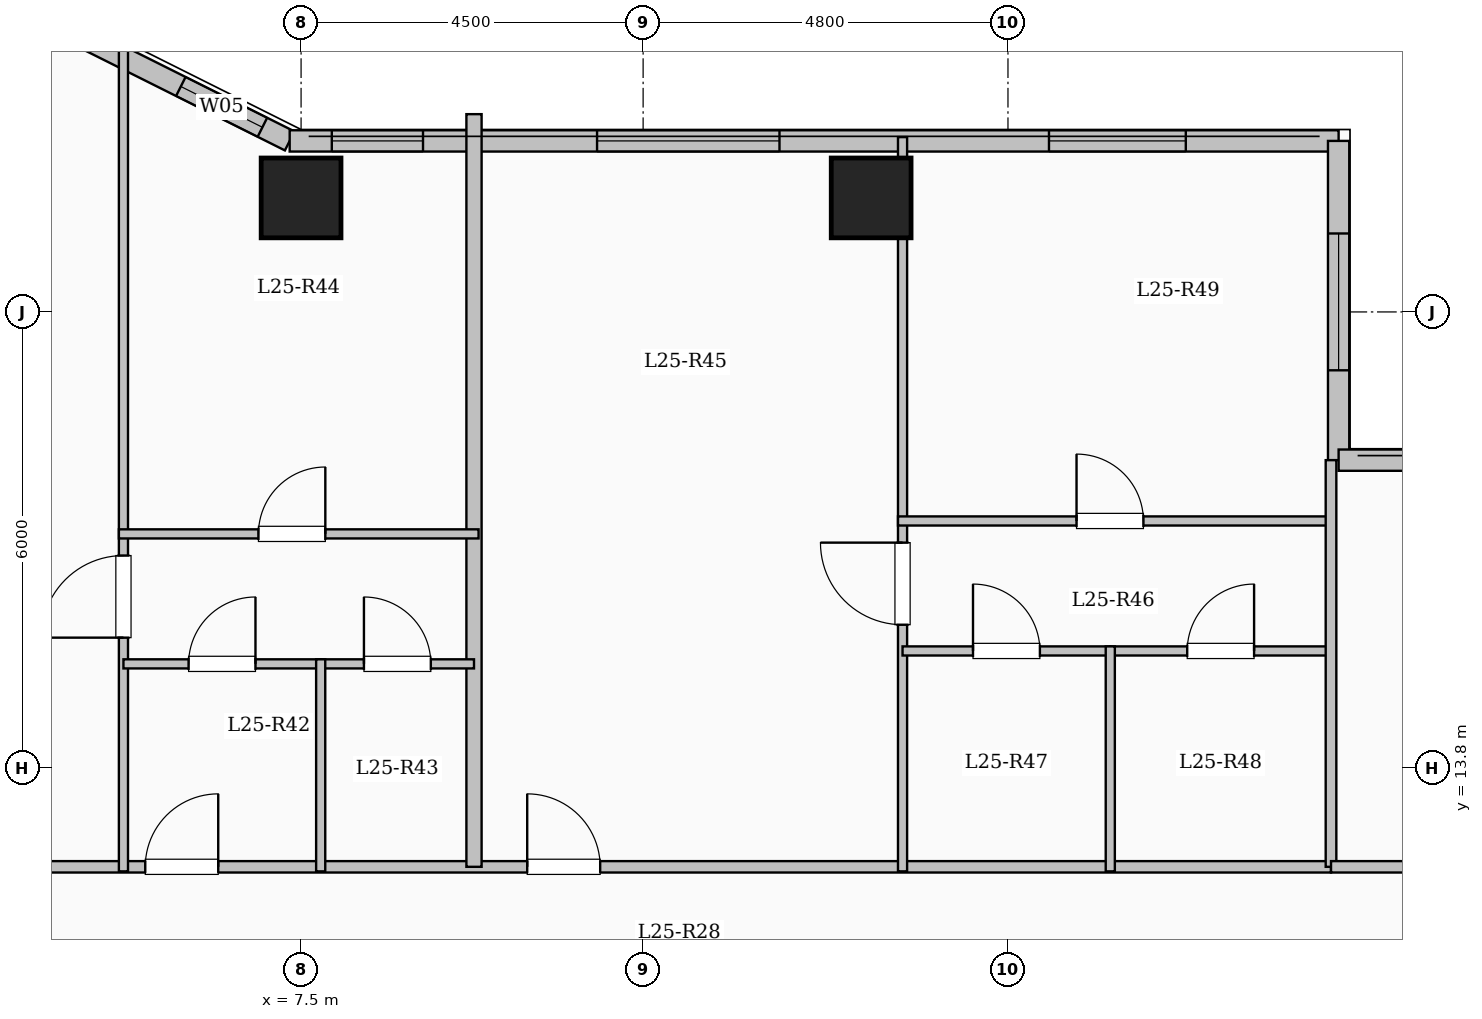
"""IFC4 building model, lengths in metres.
Left out: names, types, materials, properties, quantities, classifications, styles, units other than length and angle.
Written with IfcOpenShell. Run it as: python <this file> out.ifc"""

import sys

from ifc_helpers import new_model, si_unit, direction, frame, frame_2d, origin, origin_2d, place, context, subcontext, project, spatial, rectangle, extrude, element, fill, save


model = new_model("IFC4")
c1 = context("Model", 3, precision=1e-05, world=origin(), true_north=direction((0.0, 1.0)))
c2 = subcontext(c1, "Body", "Model", "MODEL_VIEW")
j1 = project(units=[si_unit("LENGTHUNIT", "METRE"), si_unit("PLANEANGLEUNIT", "RADIAN")], contexts=[c1])
p1 = place(None, origin())
s1 = spatial("IfcSite", under=j1, at=p1, CompositionType="ELEMENT")
p2 = place(p1, origin())
s2 = spatial("IfcBuilding", under=s1, at=p2, CompositionType="ELEMENT")
p3 = place(p2, frame((0.0, 0.0, 95.05)))
s3 = spatial("IfcBuildingStorey", under=s2, at=p3, CompositionType="ELEMENT", Elevation=95.05)
for number, where, z_axis, x_axis in (
    (1, (7.5, 21.3, 0.0), (0.0, 0.0, 1.0), (1.0, 0.0, 0.0)),
    (2, (15.0, 21.3, 0.0), (0.0, 0.0, 1.0), (1.0, 0.0, 0.0)),
):
    element("IfcColumn", number, at=place(p3, frame(where, z_axis=z_axis, x_axis=x_axis)), inside=s3, PredefinedType="COLUMN", context=c2, shape_type="SweptSolid", body=[
        extrude(rectangle(XDim=1.05, YDim=1.05, at=origin_2d()), origin(), (0.0, 0.0, 1.0), 3.35),
    ])
p4 = place(p3, frame((4.35, 23.55, 0.0), z_axis=(0.0, 0.0, 1.0), x_axis=(0.894427191, -0.4472135955, 0.0)))
e3 = element("IfcWall", 3, at=p4, inside=s3, PredefinedType="SOLIDWALL", context=c2, shape_type="SweptSolid", body=[
    extrude(rectangle(XDim=3.354, YDim=0.28, at=frame_2d((1.677, 0.0))), origin(), (0.0, 0.0, 1.0), 3.1),
])
p5 = place(p4, frame((1.753, 0.0, 0.95)))
e4 = element("IfcOpeningElement", 4, at=p5, cuts=e3, PredefinedType="OPENING", context=c2, shape_type="SweptSolid", body=[
    extrude(rectangle(XDim=1.2, YDim=1.5, at=frame_2d((0.6, 0.75))), frame((0.0, 0.15, 0.0), z_axis=(0.0, -1.0, 0.0), x_axis=(1.0, 0.0, 0.0)), (0.0, 0.0, 1.0), 0.3),
])
p6 = place(p3, frame((7.35, 22.05, 0.0), z_axis=(0.0, 0.0, 1.0), x_axis=(1.0, 0.0, 0.0)))
e5 = element("IfcWall", 5, at=p6, inside=s3, PredefinedType="SOLIDWALL", context=c2, shape_type="SweptSolid", body=[
    extrude(rectangle(XDim=13.8, YDim=0.28, at=frame_2d((6.9, 0.0))), origin(), (0.0, 0.0, 1.0), 3.1),
])
p7 = place(p6, frame((0.554, 0.0, 0.95)))
e6 = element("IfcOpeningElement", 6, at=p7, cuts=e5, PredefinedType="OPENING", context=c2, shape_type="SweptSolid", body=[
    extrude(rectangle(XDim=1.2, YDim=1.5, at=frame_2d((0.6, 0.75))), frame((0.0, 0.15, 0.0), z_axis=(0.0, -1.0, 0.0), x_axis=(1.0, 0.0, 0.0)), (0.0, 0.0, 1.0), 0.3),
])
p8 = place(p6, frame((4.044, 0.0, 0.9)))
e7 = element("IfcOpeningElement", 7, at=p8, cuts=e5, PredefinedType="OPENING", context=c2, shape_type="SweptSolid", body=[
    extrude(rectangle(XDim=2.4, YDim=1.8, at=frame_2d((1.2, 0.9))), frame((0.0, 0.15, 0.0), z_axis=(0.0, -1.0, 0.0), x_axis=(1.0, 0.0, 0.0)), (0.0, 0.0, 1.0), 0.3),
])
p9 = place(p6, frame((9.99, 0.0, 0.9)))
e8 = element("IfcOpeningElement", 8, at=p9, cuts=e5, PredefinedType="OPENING", context=c2, shape_type="SweptSolid", body=[
    extrude(rectangle(XDim=1.8, YDim=1.65, at=frame_2d((0.9, 0.825))), frame((0.0, 0.15, 0.0), z_axis=(0.0, -1.0, 0.0), x_axis=(1.0, 0.0, 0.0)), (0.0, 0.0, 1.0), 0.3),
])
p10 = place(p3, frame((21.15, 22.05, 0.0), z_axis=(0.0, 0.0, 1.0), x_axis=(0.0, -1.0, 0.0)))
e9 = element("IfcWall", 9, at=p10, inside=s3, PredefinedType="SOLIDWALL", context=c2, shape_type="SweptSolid", body=[
    extrude(rectangle(XDim=4.2, YDim=0.28, at=frame_2d((2.1, 0.0))), origin(), (0.0, 0.0, 1.0), 3.1),
])
p11 = place(p10, frame((1.218, 0.0, 0.9)))
e10 = element("IfcOpeningElement", 10, at=p11, cuts=e9, PredefinedType="OPENING", context=c2, shape_type="SweptSolid", body=[
    extrude(rectangle(XDim=1.8, YDim=1.65, at=frame_2d((0.9, 0.825))), frame((0.0, 0.15, 0.0), z_axis=(0.0, -1.0, 0.0), x_axis=(1.0, 0.0, 0.0)), (0.0, 0.0, 1.0), 0.3),
])
p12 = place(p3, frame((21.15, 17.85, 0.0), z_axis=(0.0, 0.0, 1.0), x_axis=(1.0, 0.0, 0.0)))
e11 = element("IfcWall", 11, at=p12, inside=s3, PredefinedType="SOLIDWALL", context=c2, shape_type="SweptSolid", body=[
    extrude(rectangle(XDim=5.7, YDim=0.28, at=frame_2d((2.85, 0.0))), origin(), (0.0, 0.0, 1.0), 3.1),
])
p13 = place(p12, frame((1.825, 0.0, 0.9)))
e12 = element("IfcOpeningElement", 12, at=p13, cuts=e11, PredefinedType="OPENING", context=c2, shape_type="SweptSolid", body=[
    extrude(rectangle(XDim=2.0, YDim=1.7, at=frame_2d((1.0, 0.85))), frame((0.0, 0.15, 0.0), z_axis=(0.0, -1.0, 0.0), x_axis=(1.0, 0.0, 0.0)), (0.0, 0.0, 1.0), 0.3),
])
p14 = place(p3, frame((3.85, 12.5, 0.0), z_axis=(0.0, 0.0, 1.0), x_axis=(1.0, 0.0, 0.0)))
e13 = element("IfcWall", 13, at=p14, inside=s3, PredefinedType="PARTITIONING", context=c2, shape_type="SweptSolid", body=[
    extrude(rectangle(XDim=17.2, YDim=0.15, at=frame_2d((8.6, 0.0))), origin(), (0.0, 0.0, 1.0), 3.1),
])
p15 = place(p14, frame((1.6, 0.0, 0.0)))
e14 = element("IfcOpeningElement", 14, at=p15, cuts=e13, PredefinedType="OPENING", context=c2, shape_type="SweptSolid", body=[
    extrude(rectangle(XDim=0.96, YDim=2.15, at=frame_2d((0.48, 1.075))), frame((0.0, 0.085, 0.0), z_axis=(0.0, -1.0, 0.0), x_axis=(1.0, 0.0, 0.0)), (0.0, 0.0, 1.0), 0.17),
])
p16 = place(p14, frame((6.625, 0.0, 0.0)))
e15 = element("IfcOpeningElement", 15, at=p16, cuts=e13, PredefinedType="OPENING", context=c2, shape_type="SweptSolid", body=[
    extrude(rectangle(XDim=0.96, YDim=2.15, at=frame_2d((0.48, 1.075))), frame((0.0, 0.085, 0.0), z_axis=(0.0, -1.0, 0.0), x_axis=(1.0, 0.0, 0.0)), (0.0, 0.0, 1.0), 0.17),
])
p17 = place(p3, frame((9.775, 12.5, 0.0), z_axis=(0.0, 0.0, 1.0), x_axis=(0.0, 1.0, 0.0)))
e16 = element("IfcWall", 16, at=p17, inside=s3, PredefinedType="SOLIDWALL", context=c2, shape_type="SweptSolid", body=[
    extrude(rectangle(XDim=9.902, YDim=0.2, at=frame_2d((4.951, 0.0))), origin(), (0.0, 0.0, 1.0), 3.1),
])
p18 = place(p3, frame((5.163, 12.44, 0.0), z_axis=(0.0, 0.0, 1.0), x_axis=(0.0, 1.0, 0.0)))
e17 = element("IfcWall", 17, at=p18, inside=s3, PredefinedType="PARTITIONING", context=c2, shape_type="SweptSolid", body=[
    extrude(rectangle(XDim=11.1, YDim=0.12, at=frame_2d((5.55, 0.0))), origin(), (0.0, 0.0, 1.0), 3.1),
])
p19 = place(p18, frame((3.075, 0.0, 0.0)))
e18 = element("IfcOpeningElement", 18, at=p19, cuts=e17, PredefinedType="OPENING", context=c2, shape_type="SweptSolid", body=[
    extrude(rectangle(XDim=1.08, YDim=2.15, at=frame_2d((0.54, 1.075))), frame((0.0, 0.07, 0.0), z_axis=(0.0, -1.0, 0.0), x_axis=(1.0, 0.0, 0.0)), (0.0, 0.0, 1.0), 0.14),
])
p20 = place(p3, frame((5.163, 15.17, 0.0), z_axis=(0.0, 0.0, 1.0), x_axis=(1.0, 0.0, 0.0)))
e19 = element("IfcWall", 19, at=p20, inside=s3, PredefinedType="PARTITIONING", context=c2, shape_type="SweptSolid", body=[
    extrude(rectangle(XDim=2.595, YDim=0.12, at=frame_2d((1.297, 0.0))), origin(), (0.0, 0.0, 1.0), 3.1),
])
p21 = place(p20, frame((0.857, 0.0, 0.0)))
e20 = element("IfcOpeningElement", 20, at=p21, cuts=e19, PredefinedType="OPENING", context=c2, shape_type="SweptSolid", body=[
    extrude(rectangle(XDim=0.88, YDim=2.1, at=frame_2d((0.44, 1.05))), frame((0.0, 0.07, 0.0), z_axis=(0.0, -1.0, 0.0), x_axis=(1.0, 0.0, 0.0)), (0.0, 0.0, 1.0), 0.14),
])
p22 = place(p3, frame((7.758, 15.17, 0.0), z_axis=(0.0, 0.0, 1.0), x_axis=(1.0, 0.0, 0.0)))
e21 = element("IfcWall", 21, at=p22, inside=s3, PredefinedType="PARTITIONING", context=c2, shape_type="SweptSolid", body=[
    extrude(rectangle(XDim=2.017, YDim=0.12, at=frame_2d((1.008, 0.0))), origin(), (0.0, 0.0, 1.0), 3.1),
])
p23 = place(p22, frame((0.569, 0.0, 0.0)))
e22 = element("IfcOpeningElement", 22, at=p23, cuts=e21, PredefinedType="OPENING", context=c2, shape_type="SweptSolid", body=[
    extrude(rectangle(XDim=0.88, YDim=2.1, at=frame_2d((0.44, 1.05))), frame((0.0, 0.07, 0.0), z_axis=(0.0, -1.0, 0.0), x_axis=(1.0, 0.0, 0.0)), (0.0, 0.0, 1.0), 0.14),
])
p24 = place(p3, frame((5.103, 16.88, 0.0), z_axis=(0.0, 0.0, 1.0), x_axis=(1.0, 0.0, 0.0)))
e23 = element("IfcWall", 23, at=p24, inside=s3, PredefinedType="PARTITIONING", context=c2, shape_type="SweptSolid", body=[
    extrude(rectangle(XDim=4.732, YDim=0.12, at=frame_2d((2.366, 0.0))), origin(), (0.0, 0.0, 1.0), 3.1),
])
p25 = place(p24, frame((1.836, 0.0, 0.0)))
e24 = element("IfcOpeningElement", 24, at=p25, cuts=e23, PredefinedType="OPENING", context=c2, shape_type="SweptSolid", body=[
    extrude(rectangle(XDim=0.88, YDim=2.1, at=frame_2d((0.44, 1.05))), frame((0.0, 0.07, 0.0), z_axis=(0.0, -1.0, 0.0), x_axis=(1.0, 0.0, 0.0)), (0.0, 0.0, 1.0), 0.14),
])
p26 = place(p3, frame((7.758, 12.44, 0.0), z_axis=(0.0, 0.0, 1.0), x_axis=(0.0, 1.0, 0.0)))
e25 = element("IfcWall", 25, at=p26, inside=s3, PredefinedType="PARTITIONING", context=c2, shape_type="SweptSolid", body=[
    extrude(rectangle(XDim=2.79, YDim=0.12, at=frame_2d((1.395, 0.0))), origin(), (0.0, 0.0, 1.0), 2.435),
])
p27 = place(p3, frame((15.413, 12.44, 0.0), z_axis=(0.0, 0.0, 1.0), x_axis=(0.0, 1.0, 0.0)))
e26 = element("IfcWall", 26, at=p27, inside=s3, PredefinedType="PARTITIONING", context=c2, shape_type="SweptSolid", body=[
    extrude(rectangle(XDim=9.66, YDim=0.12, at=frame_2d((4.83, 0.0))), origin(), (0.0, 0.0, 1.0), 3.1),
])
p28 = place(p27, frame((3.245, 0.0, 0.0)))
e27 = element("IfcOpeningElement", 27, at=p28, cuts=e26, PredefinedType="OPENING", context=c2, shape_type="SweptSolid", body=[
    extrude(rectangle(XDim=1.08, YDim=2.15, at=frame_2d((0.54, 1.075))), frame((0.0, 0.07, 0.0), z_axis=(0.0, -1.0, 0.0), x_axis=(1.0, 0.0, 0.0)), (0.0, 0.0, 1.0), 0.14),
])
p29 = place(p3, frame((15.413, 15.34, 0.0), z_axis=(0.0, 0.0, 1.0), x_axis=(1.0, 0.0, 0.0)))
e28 = element("IfcWall", 28, at=p29, inside=s3, PredefinedType="PARTITIONING", context=c2, shape_type="SweptSolid", body=[
    extrude(rectangle(XDim=2.733, YDim=0.12, at=frame_2d((1.366, 0.0))), origin(), (0.0, 0.0, 1.0), 3.1),
])
p30 = place(p29, frame((0.927, 0.0, 0.0)))
e29 = element("IfcOpeningElement", 29, at=p30, cuts=e28, PredefinedType="OPENING", context=c2, shape_type="SweptSolid", body=[
    extrude(rectangle(XDim=0.88, YDim=2.1, at=frame_2d((0.44, 1.05))), frame((0.0, 0.07, 0.0), z_axis=(0.0, -1.0, 0.0), x_axis=(1.0, 0.0, 0.0)), (0.0, 0.0, 1.0), 0.14),
])
p31 = place(p3, frame((18.146, 15.34, 0.0), z_axis=(0.0, 0.0, 1.0), x_axis=(1.0, 0.0, 0.0)))
e30 = element("IfcWall", 30, at=p31, inside=s3, PredefinedType="PARTITIONING", context=c2, shape_type="SweptSolid", body=[
    extrude(rectangle(XDim=2.904, YDim=0.12, at=frame_2d((1.452, 0.0))), origin(), (0.0, 0.0, 1.0), 3.1),
])
p32 = place(p31, frame((1.012, 0.0, 0.0)))
e31 = element("IfcOpeningElement", 31, at=p32, cuts=e30, PredefinedType="OPENING", context=c2, shape_type="SweptSolid", body=[
    extrude(rectangle(XDim=0.88, YDim=2.1, at=frame_2d((0.44, 1.05))), frame((0.0, 0.07, 0.0), z_axis=(0.0, -1.0, 0.0), x_axis=(1.0, 0.0, 0.0)), (0.0, 0.0, 1.0), 0.14),
])
p33 = place(p3, frame((15.353, 17.05, 0.0), z_axis=(0.0, 0.0, 1.0), x_axis=(1.0, 0.0, 0.0)))
e32 = element("IfcWall", 32, at=p33, inside=s3, PredefinedType="PARTITIONING", context=c2, shape_type="SweptSolid", body=[
    extrude(rectangle(XDim=5.757, YDim=0.12, at=frame_2d((2.878, 0.0))), origin(), (0.0, 0.0, 1.0), 3.1),
])
p34 = place(p33, frame((2.349, 0.0, 0.0)))
e33 = element("IfcOpeningElement", 33, at=p34, cuts=e32, PredefinedType="OPENING", context=c2, shape_type="SweptSolid", body=[
    extrude(rectangle(XDim=0.88, YDim=2.1, at=frame_2d((0.44, 1.05))), frame((0.0, 0.07, 0.0), z_axis=(0.0, -1.0, 0.0), x_axis=(1.0, 0.0, 0.0)), (0.0, 0.0, 1.0), 0.14),
])
p35 = place(p3, frame((18.146, 12.44, 0.0), z_axis=(0.0, 0.0, 1.0), x_axis=(0.0, 1.0, 0.0)))
e34 = element("IfcWall", 34, at=p35, inside=s3, PredefinedType="PARTITIONING", context=c2, shape_type="SweptSolid", body=[
    extrude(rectangle(XDim=2.96, YDim=0.12, at=frame_2d((1.48, 0.0))), origin(), (0.0, 0.0, 1.0), 3.1),
])
p36 = place(p3, frame((21.05, 12.5, 0.0), z_axis=(0.0, 0.0, 1.0), x_axis=(0.0, 1.0, 0.0)))
e35 = element("IfcWall", 35, at=p36, inside=s3, PredefinedType="PARTITIONING", context=c2, shape_type="SweptSolid", body=[
    extrude(rectangle(XDim=5.35, YDim=0.14, at=frame_2d((2.675, 0.0))), origin(), (0.0, 0.0, 1.0), 3.1),
])
p37 = place(p3, frame((21.05, 12.5, 0.0), z_axis=(0.0, 0.0, 1.0), x_axis=(1.0, 0.0, 0.0)))
e36 = element("IfcWall", 36, at=p37, inside=s3, PredefinedType="PARTITIONING", context=c2, shape_type="SweptSolid", body=[
    extrude(rectangle(XDim=5.83, YDim=0.15, at=frame_2d((2.915, 0.0))), origin(), (0.0, 0.0, 1.0), 3.1),
])
p38 = place(p37, frame((2.44, 0.0, 0.0)))
e37 = element("IfcOpeningElement", 37, at=p38, cuts=e36, PredefinedType="OPENING", context=c2, shape_type="SweptSolid", body=[
    extrude(rectangle(XDim=0.95, YDim=2.15, at=frame_2d((0.475, 1.075))), frame((0.0, 0.085, 0.0), z_axis=(0.0, -1.0, 0.0), x_axis=(1.0, 0.0, 0.0)), (0.0, 0.0, 1.0), 0.17),
])
p39 = place(p5, origin())
e38 = element("IfcWindow", 38, at=p39, inside=s3, PartitioningType="SINGLE_PANEL", PredefinedType="WINDOW", context=c2, shape_type="SweptSolid", body=[
    extrude(rectangle(XDim=1.2, YDim=1.5, at=frame_2d((0.6, 0.75))), frame((0.0, 0.03, 0.0), z_axis=(0.0, -1.0, 0.0), x_axis=(1.0, 0.0, 0.0)), (0.0, 0.0, 1.0), 0.06),
])
fill(e4, e38)
p40 = place(p7, origin())
e39 = element("IfcWindow", 39, at=p40, inside=s3, PartitioningType="SINGLE_PANEL", PredefinedType="WINDOW", context=c2, shape_type="SweptSolid", body=[
    extrude(rectangle(XDim=1.2, YDim=1.5, at=frame_2d((0.6, 0.75))), frame((0.0, 0.03, 0.0), z_axis=(0.0, -1.0, 0.0), x_axis=(1.0, 0.0, 0.0)), (0.0, 0.0, 1.0), 0.06),
])
fill(e6, e39)
p41 = place(p8, origin())
e40 = element("IfcWindow", 40, at=p41, inside=s3, PartitioningType="SINGLE_PANEL", PredefinedType="WINDOW", context=c2, shape_type="SweptSolid", body=[
    extrude(rectangle(XDim=2.4, YDim=1.8, at=frame_2d((1.2, 0.9))), frame((0.0, 0.03, 0.0), z_axis=(0.0, -1.0, 0.0), x_axis=(1.0, 0.0, 0.0)), (0.0, 0.0, 1.0), 0.06),
])
fill(e7, e40)
p42 = place(p9, origin())
e41 = element("IfcWindow", 41, at=p42, inside=s3, PartitioningType="SINGLE_PANEL", PredefinedType="WINDOW", context=c2, shape_type="SweptSolid", body=[
    extrude(rectangle(XDim=1.8, YDim=1.65, at=frame_2d((0.9, 0.825))), frame((0.0, 0.03, 0.0), z_axis=(0.0, -1.0, 0.0), x_axis=(1.0, 0.0, 0.0)), (0.0, 0.0, 1.0), 0.06),
])
fill(e8, e41)
p43 = place(p11, origin())
e42 = element("IfcWindow", 42, at=p43, inside=s3, PartitioningType="SINGLE_PANEL", PredefinedType="WINDOW", context=c2, shape_type="SweptSolid", body=[
    extrude(rectangle(XDim=1.8, YDim=1.65, at=frame_2d((0.9, 0.825))), frame((0.0, 0.03, 0.0), z_axis=(0.0, -1.0, 0.0), x_axis=(1.0, 0.0, 0.0)), (0.0, 0.0, 1.0), 0.06),
])
fill(e10, e42)
p44 = place(p15, origin())
e43 = element("IfcDoor", 43, at=p44, inside=s3, OperationType="SINGLE_SWING_RIGHT", PredefinedType="DOOR", context=c2, shape_type="SweptSolid", body=[
    extrude(rectangle(XDim=0.96, YDim=2.15, at=frame_2d((0.48, 1.075))), frame((0.0, 0.025, 0.0), z_axis=(0.0, -1.0, 0.0), x_axis=(1.0, 0.0, 0.0)), (0.0, 0.0, 1.0), 0.05),
])
fill(e14, e43)
p45 = place(p19, origin())
e44 = element("IfcDoor", 44, at=p45, inside=s3, OperationType="SINGLE_SWING_LEFT", PredefinedType="DOOR", context=c2, shape_type="SweptSolid", body=[
    extrude(rectangle(XDim=1.08, YDim=2.15, at=frame_2d((0.54, 1.075))), frame((0.0, 0.025, 0.0), z_axis=(0.0, -1.0, 0.0), x_axis=(1.0, 0.0, 0.0)), (0.0, 0.0, 1.0), 0.05),
])
fill(e18, e44)
p46 = place(p21, origin())
e45 = element("IfcDoor", 45, at=p46, inside=s3, OperationType="SINGLE_SWING_RIGHT", PredefinedType="DOOR", context=c2, shape_type="SweptSolid", body=[
    extrude(rectangle(XDim=0.88, YDim=2.1, at=frame_2d((0.44, 1.05))), frame((0.0, 0.025, 0.0), z_axis=(0.0, -1.0, 0.0), x_axis=(1.0, 0.0, 0.0)), (0.0, 0.0, 1.0), 0.05),
])
fill(e20, e45)
p47 = place(p23, origin())
e46 = element("IfcDoor", 46, at=p47, inside=s3, OperationType="SINGLE_SWING_LEFT", PredefinedType="DOOR", context=c2, shape_type="SweptSolid", body=[
    extrude(rectangle(XDim=0.88, YDim=2.1, at=frame_2d((0.44, 1.05))), frame((0.0, 0.025, 0.0), z_axis=(0.0, -1.0, 0.0), x_axis=(1.0, 0.0, 0.0)), (0.0, 0.0, 1.0), 0.05),
])
fill(e22, e46)
p48 = place(p25, origin())
e47 = element("IfcDoor", 47, at=p48, inside=s3, OperationType="SINGLE_SWING_RIGHT", PredefinedType="DOOR", context=c2, shape_type="SweptSolid", body=[
    extrude(rectangle(XDim=0.88, YDim=2.1, at=frame_2d((0.44, 1.05))), frame((0.0, 0.025, 0.0), z_axis=(0.0, -1.0, 0.0), x_axis=(1.0, 0.0, 0.0)), (0.0, 0.0, 1.0), 0.05),
])
fill(e24, e47)
p49 = place(p16, origin())
e48 = element("IfcDoor", 48, at=p49, inside=s3, OperationType="SINGLE_SWING_LEFT", PredefinedType="DOOR", context=c2, shape_type="SweptSolid", body=[
    extrude(rectangle(XDim=0.96, YDim=2.15, at=frame_2d((0.48, 1.075))), frame((0.0, 0.025, 0.0), z_axis=(0.0, -1.0, 0.0), x_axis=(1.0, 0.0, 0.0)), (0.0, 0.0, 1.0), 0.05),
])
fill(e15, e48)
p50 = place(p28, origin())
e49 = element("IfcDoor", 49, at=p50, inside=s3, OperationType="SINGLE_SWING_RIGHT", PredefinedType="DOOR", context=c2, shape_type="SweptSolid", body=[
    extrude(rectangle(XDim=1.08, YDim=2.15, at=frame_2d((0.54, 1.075))), frame((0.0, 0.025, 0.0), z_axis=(0.0, -1.0, 0.0), x_axis=(1.0, 0.0, 0.0)), (0.0, 0.0, 1.0), 0.05),
])
fill(e27, e49)
p51 = place(p30, origin())
e50 = element("IfcDoor", 50, at=p51, inside=s3, OperationType="SINGLE_SWING_LEFT", PredefinedType="DOOR", context=c2, shape_type="SweptSolid", body=[
    extrude(rectangle(XDim=0.88, YDim=2.1, at=frame_2d((0.44, 1.05))), frame((0.0, 0.025, 0.0), z_axis=(0.0, -1.0, 0.0), x_axis=(1.0, 0.0, 0.0)), (0.0, 0.0, 1.0), 0.05),
])
fill(e29, e50)
p52 = place(p32, origin())
e51 = element("IfcDoor", 51, at=p52, inside=s3, OperationType="SINGLE_SWING_RIGHT", PredefinedType="DOOR", context=c2, shape_type="SweptSolid", body=[
    extrude(rectangle(XDim=0.88, YDim=2.1, at=frame_2d((0.44, 1.05))), frame((0.0, 0.025, 0.0), z_axis=(0.0, -1.0, 0.0), x_axis=(1.0, 0.0, 0.0)), (0.0, 0.0, 1.0), 0.05),
])
fill(e31, e51)
p53 = place(p34, origin())
e52 = element("IfcDoor", 52, at=p53, inside=s3, OperationType="SINGLE_SWING_LEFT", PredefinedType="DOOR", context=c2, shape_type="SweptSolid", body=[
    extrude(rectangle(XDim=0.88, YDim=2.1, at=frame_2d((0.44, 1.05))), frame((0.0, 0.025, 0.0), z_axis=(0.0, -1.0, 0.0), x_axis=(1.0, 0.0, 0.0)), (0.0, 0.0, 1.0), 0.05),
])
fill(e33, e52)
save(model, sys.argv[1])
